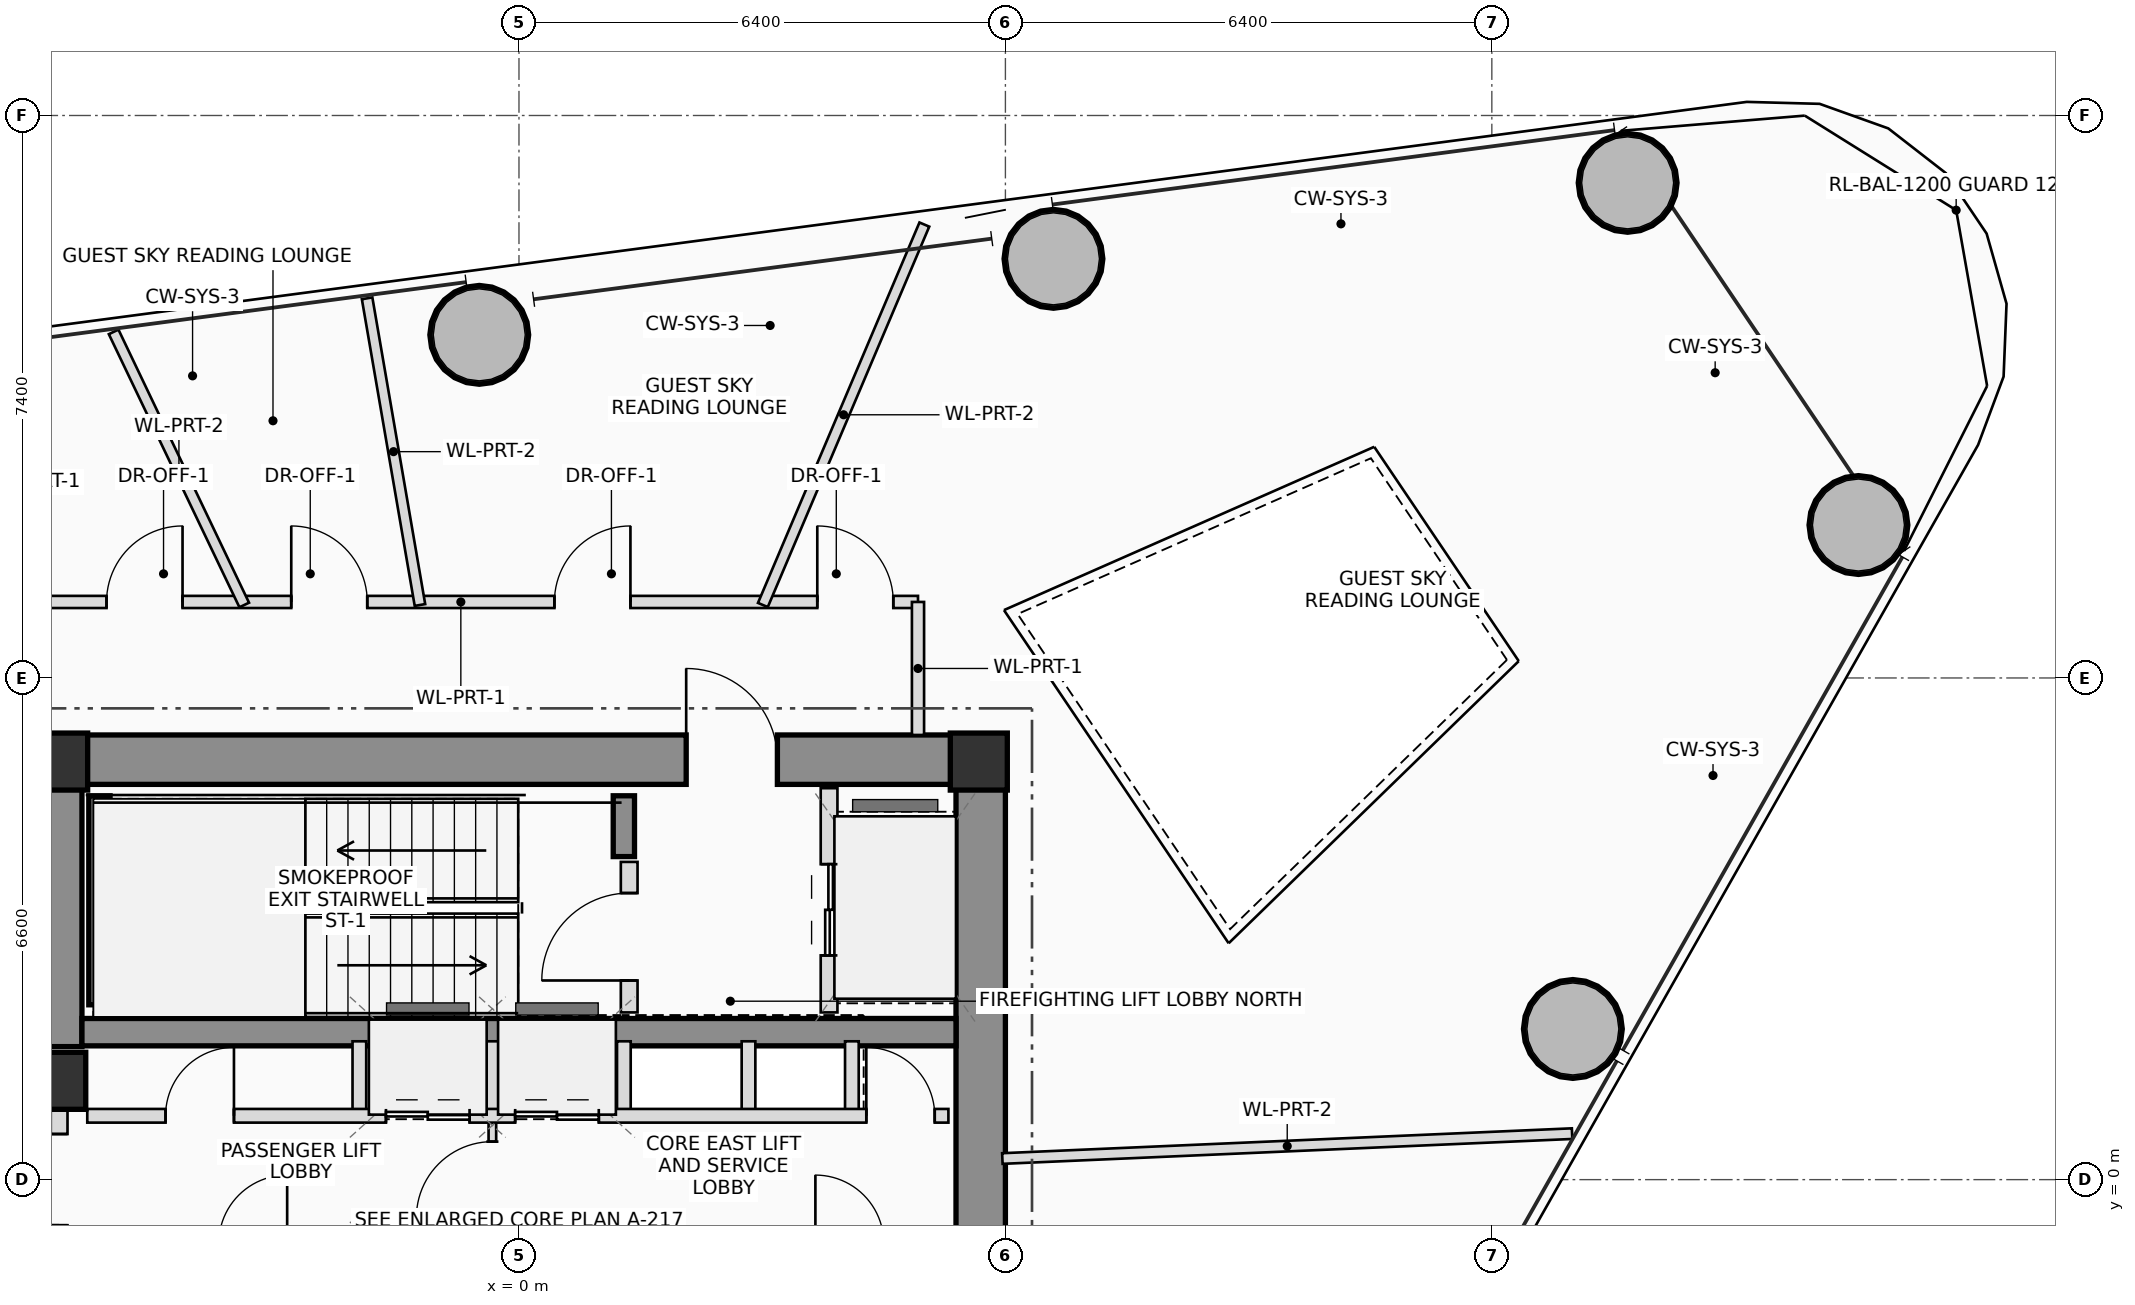
"""IFC4 building model, lengths in metres.
Left out: names, types, materials, properties, quantities, classifications, styles, units other than length and angle.
Written with IfcOpenShell. Run it as: python <this file> out.ifc"""

import sys

from ifc_helpers import new_model, si_unit, direction, frame, frame_2d, origin, origin_2d, place, context, subcontext, project, spatial, rectangle, hollow_circle, extrude, source, transform, mapped, element, fill, save


model = new_model("IFC4")
c1 = context("Model", 3, precision=1e-05, world=origin(), true_north=direction((0.0, 1.0)))
c2 = subcontext(c1, "Body", "Model", "MODEL_VIEW")
j1 = project(units=[si_unit("LENGTHUNIT", "METRE"), si_unit("PLANEANGLEUNIT", "RADIAN")], contexts=[c1])
p1 = place(None, origin())
s1 = spatial("IfcSite", under=j1, at=p1, CompositionType="ELEMENT")
p2 = place(p1, origin())
s2 = spatial("IfcBuilding", under=s1, at=p2, CompositionType="ELEMENT")
p3 = place(p2, frame((0.0, 0.0, 182.9)))
s3 = spatial("IfcBuildingStorey", under=s2, at=p3, CompositionType="ELEMENT", Elevation=182.9)
m1 = source(origin(), c2, "Body", "SweptSolid", [
    extrude(rectangle(XDim=0.75, YDim=0.75, at=origin_2d()), origin(), (0.0, 0.0, 1.0), 3.45),
])
for number, where, z_axis, x_axis in (
    (1, (6.05, 5.5, 0.0), (0.0, 0.0, 1.0), (1.0, 0.0, 0.0)),
    (2, (-6.05, 5.5, 0.0), (0.0, 0.0, 1.0), (1.0, 0.0, 0.0)),
):
    element("IfcColumn", number, at=place(p3, frame(where, z_axis=z_axis, x_axis=x_axis)), inside=s3, PredefinedType="COLUMN", context=c2, shape_type="MappedRepresentation", body=[
        mapped(m1, transform((0.0, 0.0, 0.0), scale=1.0)),
    ])
p4 = place(p3, frame((-6.4, 5.525, 0.0), z_axis=(0.0, 0.0, 1.0), x_axis=(1.0, 0.0, 0.0)))
e3 = element("IfcWall", 3, at=p4, inside=s3, PredefinedType="SHEAR", context=c2, shape_type="SweptSolid", body=[
    extrude(rectangle(XDim=12.8, YDim=0.65, at=frame_2d((6.4, 0.0))), origin(), (0.0, 0.0, 1.0), 3.45),
])
p5 = place(p4, frame((8.6, 0.0, 0.0)))
e4 = element("IfcOpeningElement", 4, at=p5, cuts=e3, PredefinedType="OPENING", context=c2, shape_type="SweptSolid", body=[
    extrude(rectangle(XDim=1.2, YDim=2.2, at=frame_2d((0.6, 1.1))), frame((0.0, 0.335, 0.0), z_axis=(0.0, -1.0, 0.0), x_axis=(1.0, 0.0, 0.0)), (0.0, 0.0, 1.0), 0.67),
])
p6 = place(p3, frame((6.075, -5.2, 0.0), z_axis=(0.0, 0.0, 1.0), x_axis=(0.0, 1.0, 0.0)))
e5 = element("IfcWall", 5, at=p6, inside=s3, PredefinedType="SHEAR", context=c2, shape_type="SweptSolid", body=[
    extrude(rectangle(XDim=10.4, YDim=0.65, at=frame_2d((5.2, 0.0))), origin(), (0.0, 0.0, 1.0), 3.45),
])
p7 = place(p3, frame((-6.075, 1.75, 0.0), z_axis=(0.0, 0.0, 1.0), x_axis=(0.0, 1.0, 0.0)))
e6 = element("IfcWall", 6, at=p7, inside=s3, PredefinedType="SHEAR", context=c2, shape_type="SweptSolid", body=[
    extrude(rectangle(XDim=3.45, YDim=0.65, at=frame_2d((1.725, 0.0))), origin(), (0.0, 0.0, 1.0), 3.45),
])
p8 = place(p3, frame((-5.75, 1.94, 0.0), z_axis=(0.0, 0.0, 1.0), x_axis=(1.0, 0.0, 0.0)))
e7 = element("IfcWall", 7, at=p8, inside=s3, PredefinedType="SHEAR", context=c2, shape_type="SweptSolid", body=[
    extrude(rectangle(XDim=11.5, YDim=0.36, at=frame_2d((5.75, 0.0))), origin(), (0.0, 0.0, 1.0), 3.45),
])
p9 = place(p3, frame((-5.52, 2.3, 0.0), z_axis=(0.0, 0.0, 1.0), x_axis=(0.0, 1.0, 0.0)))
e8 = element("IfcWall", 8, at=p9, inside=s3, PredefinedType="SHEAR", context=c2, shape_type="SweptSolid", body=[
    extrude(rectangle(XDim=2.75, YDim=0.28, at=frame_2d((1.375, 0.0))), origin(), (0.0, 0.0, 1.0), 3.45),
])
p10 = place(p3, frame((1.38, 4.25, 0.0), z_axis=(0.0, 0.0, 1.0), x_axis=(0.0, 1.0, 0.0)))
e9 = element("IfcWall", 9, at=p10, inside=s3, PredefinedType="SHEAR", context=c2, shape_type="SweptSolid", body=[
    extrude(rectangle(XDim=0.8, YDim=0.28, at=frame_2d((0.4, 0.0))), origin(), (0.0, 0.0, 1.0), 3.45),
])
p11 = place(p3, frame((-6.075, 1.3, 0.0), z_axis=(0.0, 0.0, 1.0), x_axis=(1.0, 0.0, 0.0)))
e10 = element("IfcColumn", 10, at=p11, inside=s3, PredefinedType="COLUMN", context=c2, shape_type="MappedRepresentation", body=[
    mapped(m1, transform((0.0, 0.0, 0.0), scale=1.0)),
])
m2 = source(origin(), c2, "Body", "SweptSolid", [
    extrude(hollow_circle(Radius=0.65, WallThickness=0.045, at=origin_2d()), origin(), (0.0, 0.0, 1.0), 3.45),
])
for number, where, z_axis, x_axis in (
    (11, (13.866, 1.982, 0.0), (0.0, 0.0, 1.0), (1.0, 0.0, 0.0)),
    (12, (17.624, 8.612, 0.0), (0.0, 0.0, 1.0), (1.0, 0.0, 0.0)),
    (13, (14.587, 13.114, 0.0), (0.0, 0.0, 1.0), (1.0, 0.0, 0.0)),
    (14, (7.032, 12.114, 0.0), (0.0, 0.0, 1.0), (1.0, 0.0, 0.0)),
    (15, (-0.522, 11.114, 0.0), (0.0, 0.0, 1.0), (1.0, 0.0, 0.0)),
):
    element("IfcColumn", number, at=place(p3, frame(where, z_axis=z_axis, x_axis=x_axis)), inside=s3, PredefinedType="COLUMN", context=c2, shape_type="MappedRepresentation", body=[
        mapped(m2, transform((0.0, 0.0, 0.0), scale=1.0)),
    ])
p12 = place(p3, frame((-6.05, -0.95, 0.0), z_axis=(0.0, 0.0, 1.0), x_axis=(0.0, 1.0, 0.0)))
e16 = element("IfcWall", 16, at=p12, inside=s3, PredefinedType="PLUMBINGWALL", context=c2, shape_type="SweptSolid", body=[
    extrude(rectangle(XDim=1.9, YDim=0.22, at=frame_2d((0.95, 0.0))), origin(), (0.0, 0.0, 1.0), 2.19),
])
p13 = place(p12, frame((0.35, 0.0, 0.0)))
e17 = element("IfcOpeningElement", 17, at=p13, cuts=e16, PredefinedType="OPENING", context=c2, shape_type="SweptSolid", body=[
    extrude(rectangle(XDim=1.2, YDim=2.2, at=frame_2d((0.6, 1.1))), frame((0.0, 0.12, 0.0), z_axis=(0.0, -1.0, 0.0), x_axis=(1.0, 0.0, 0.0)), (0.0, 0.0, 1.0), 0.24),
])
p14 = place(p3, frame((1.45, 2.2, 0.0), z_axis=(0.0, 0.0, 1.0), x_axis=(0.0, 1.0, 0.0)))
e18 = element("IfcWall", 18, at=p14, inside=s3, PredefinedType="PLUMBINGWALL", context=c2, shape_type="SweptSolid", body=[
    extrude(rectangle(XDim=1.98, YDim=0.22, at=frame_2d((0.99, 0.0))), origin(), (0.0, 0.0, 1.0), 3.21),
])
p15 = place(p14, frame((0.42, 0.0, 0.0)))
e19 = element("IfcOpeningElement", 19, at=p15, cuts=e18, PredefinedType="OPENING", context=c2, shape_type="SweptSolid", body=[
    extrude(rectangle(XDim=1.15, YDim=2.15, at=frame_2d((0.575, 1.075))), frame((0.0, 0.12, 0.0), z_axis=(0.0, -1.0, 0.0), x_axis=(1.0, 0.0, 0.0)), (0.0, 0.0, 1.0), 0.24),
])
p16 = place(p3, frame((4.08, 2.2, 0.0), z_axis=(0.0, 0.0, 1.0), x_axis=(0.0, 1.0, 0.0)))
e20 = element("IfcWall", 20, at=p16, inside=s3, PredefinedType="PLUMBINGWALL", context=c2, shape_type="SweptSolid", body=[
    extrude(rectangle(XDim=2.95, YDim=0.22, at=frame_2d((1.475, 0.0))), origin(), (0.0, 0.0, 1.0), 3.21),
])
p17 = place(p16, frame((0.75, 0.0, 0.0)))
e21 = element("IfcOpeningElement", 21, at=p17, cuts=e20, PredefinedType="OPENING", context=c2, shape_type="SweptSolid", body=[
    extrude(rectangle(XDim=1.2, YDim=2.25, at=frame_2d((0.6, 1.125))), frame((0.0, 0.12, 0.0), z_axis=(0.0, -1.0, 0.0), x_axis=(1.0, 0.0, 0.0)), (0.0, 0.0, 1.0), 0.24),
])
p18 = place(p3, frame((-0.35, -0.84, 0.0), z_axis=(0.0, 0.0, 1.0), x_axis=(0.0, 1.0, 0.0)))
e22 = element("IfcWall", 22, at=p18, inside=s3, PredefinedType="PARTITIONING", context=c2, shape_type="SweptSolid", body=[
    extrude(rectangle(XDim=1.68, YDim=0.1, at=frame_2d((0.84, 0.0))), origin(), (0.0, 0.0, 1.0), 3.21),
])
p19 = place(p18, frame((0.34, 0.0, 0.0)))
e23 = element("IfcOpeningElement", 23, at=p19, cuts=e22, PredefinedType="OPENING", context=c2, shape_type="SweptSolid", body=[
    extrude(rectangle(XDim=1.0, YDim=2.25, at=frame_2d((0.5, 1.125))), frame((0.0, 0.06, 0.0), z_axis=(0.0, -1.0, 0.0), x_axis=(1.0, 0.0, 0.0)), (0.0, 0.0, 1.0), 0.12),
])
for number, where, z_axis, x_axis in (
    (24, (-2.1, 0.84, 0.0), (0.0, 0.0, 1.0), (0.0, 1.0, 0.0)),
    (25, (-0.35, 0.84, 0.0), (0.0, 0.0, 1.0), (0.0, 1.0, 0.0)),
    (26, (1.38, 0.84, 0.0), (0.0, 0.0, 1.0), (0.0, 1.0, 0.0)),
    (27, (3.02, 0.84, 0.0), (0.0, 0.0, 1.0), (0.0, 1.0, 0.0)),
    (28, (4.38, 0.84, 0.0), (0.0, 0.0, 1.0), (0.0, 1.0, 0.0)),
):
    element("IfcWall", number, at=place(p3, frame(where, z_axis=z_axis, x_axis=x_axis)), inside=s3, PredefinedType="PLUMBINGWALL", context=c2, shape_type="SweptSolid", body=[
        extrude(rectangle(XDim=0.98, YDim=0.18, at=frame_2d((0.49, 0.0))), origin(), (0.0, 0.0, 1.0), 3.21),
    ])
p20 = place(p3, frame((-5.68, 0.84, 0.0), z_axis=(0.0, 0.0, 1.0), x_axis=(1.0, 0.0, 0.0)))
e29 = element("IfcWall", 29, at=p20, inside=s3, PredefinedType="PLUMBINGWALL", context=c2, shape_type="SweptSolid", body=[
    extrude(rectangle(XDim=11.33, YDim=0.18, at=frame_2d((5.665, 0.0))), origin(), (0.0, 0.0, 1.0), 3.21),
])
p21 = place(p20, frame((1.03, 0.0, 0.0)))
e30 = element("IfcOpeningElement", 30, at=p21, cuts=e29, PredefinedType="OPENING", context=c2, shape_type="SweptSolid", body=[
    extrude(rectangle(XDim=0.9, YDim=2.05, at=frame_2d((0.45, 1.025))), frame((0.0, 0.1, 0.0), z_axis=(0.0, -1.0, 0.0), x_axis=(1.0, 0.0, 0.0)), (0.0, 0.0, 1.0), 0.2),
])
p22 = place(p20, frame((3.93, 0.0, 0.0)))
e31 = element("IfcOpeningElement", 31, at=p22, cuts=e29, PredefinedType="OPENING", context=c2, shape_type="SweptSolid", body=[
    extrude(rectangle(XDim=1.1, YDim=2.2, at=frame_2d((0.55, 1.1))), frame((0.0, 0.1, 0.0), z_axis=(0.0, -1.0, 0.0), x_axis=(1.0, 0.0, 0.0)), (0.0, 0.0, 1.0), 0.2),
])
p23 = place(p20, frame((5.63, 0.0, 0.0)))
e32 = element("IfcOpeningElement", 32, at=p23, cuts=e29, PredefinedType="OPENING", context=c2, shape_type="SweptSolid", body=[
    extrude(rectangle(XDim=1.1, YDim=2.2, at=frame_2d((0.55, 1.1))), frame((0.0, 0.1, 0.0), z_axis=(0.0, -1.0, 0.0), x_axis=(1.0, 0.0, 0.0)), (0.0, 0.0, 1.0), 0.2),
])
p24 = place(p20, frame((10.25, 0.0, 0.0)))
e33 = element("IfcOpeningElement", 33, at=p24, cuts=e29, PredefinedType="OPENING", context=c2, shape_type="SweptSolid", body=[
    extrude(rectangle(XDim=0.9, YDim=2.05, at=frame_2d((0.45, 1.025))), frame((0.0, 0.1, 0.0), z_axis=(0.0, -1.0, 0.0), x_axis=(1.0, 0.0, 0.0)), (0.0, 0.0, 1.0), 0.2),
])
p25 = place(p3, frame((-6.36, 7.6, 0.0), z_axis=(0.0, 0.0, 1.0), x_axis=(1.0, 0.0, 0.0)))
e34 = element("IfcWall", 34, at=p25, inside=s3, PredefinedType="PARTITIONING", context=c2, shape_type="SweptSolid", body=[
    extrude(rectangle(XDim=11.61, YDim=0.16, at=frame_2d((5.805, 0.0))), origin(), (0.0, 0.0, 1.0), 2.565),
])
p26 = place(p25, frame((0.934, 0.0, 0.0)))
e35 = element("IfcOpeningElement", 35, at=p26, cuts=e34, PredefinedType="OPENING", context=c2, shape_type="SweptSolid", body=[
    extrude(rectangle(XDim=1.0, YDim=2.25, at=frame_2d((0.5, 1.125))), frame((0.0, 0.09, 0.0), z_axis=(0.0, -1.0, 0.0), x_axis=(1.0, 0.0, 0.0)), (0.0, 0.0, 1.0), 0.18),
])
p27 = place(p25, frame((3.364, 0.0, 0.0)))
e36 = element("IfcOpeningElement", 36, at=p27, cuts=e34, PredefinedType="OPENING", context=c2, shape_type="SweptSolid", body=[
    extrude(rectangle(XDim=1.0, YDim=2.25, at=frame_2d((0.5, 1.125))), frame((0.0, 0.09, 0.0), z_axis=(0.0, -1.0, 0.0), x_axis=(1.0, 0.0, 0.0)), (0.0, 0.0, 1.0), 0.18),
])
p28 = place(p25, frame((6.826, 0.0, 0.0)))
e37 = element("IfcOpeningElement", 37, at=p28, cuts=e34, PredefinedType="OPENING", context=c2, shape_type="SweptSolid", body=[
    extrude(rectangle(XDim=1.0, YDim=2.25, at=frame_2d((0.5, 1.125))), frame((0.0, 0.09, 0.0), z_axis=(0.0, -1.0, 0.0), x_axis=(1.0, 0.0, 0.0)), (0.0, 0.0, 1.0), 0.18),
])
p29 = place(p25, frame((10.285, 0.0, 0.0)))
e38 = element("IfcOpeningElement", 38, at=p29, cuts=e34, PredefinedType="OPENING", context=c2, shape_type="SweptSolid", body=[
    extrude(rectangle(XDim=1.0, YDim=2.25, at=frame_2d((0.5, 1.125))), frame((0.0, 0.09, 0.0), z_axis=(0.0, -1.0, 0.0), x_axis=(1.0, 0.0, 0.0)), (0.0, 0.0, 1.0), 0.18),
])
p30 = place(p3, frame((5.25, 7.6, 0.0), z_axis=(0.0, 0.0, 1.0), x_axis=(0.0, -1.0, 0.0)))
e39 = element("IfcWall", 39, at=p30, inside=s3, PredefinedType="PARTITIONING", context=c2, shape_type="SweptSolid", body=[
    extrude(rectangle(XDim=1.75, YDim=0.16, at=frame_2d((0.875, 0.0))), origin(), (0.0, 0.0, 1.0), 3.21),
])
p31 = place(p3, frame((6.36, 0.278, 0.0), z_axis=(0.0, 0.0, 1.0), x_axis=(0.999047543566, 0.043634913719, 0.0)))
e40 = element("IfcWall", 40, at=p31, inside=s3, PredefinedType="PARTITIONING", context=c2, shape_type="SweptSolid", body=[
    extrude(rectangle(XDim=7.503, YDim=0.14, at=frame_2d((3.751, 0.0))), origin(), (0.0, 0.0, 1.0), 2.725),
])
p32 = place(p3, frame((3.209, 7.56, 0.0), z_axis=(0.0, 0.0, 1.0), x_axis=(0.390725109397, 0.920507408382, 0.0)))
e41 = element("IfcWall", 41, at=p32, inside=s3, PredefinedType="PARTITIONING", context=c2, shape_type="SweptSolid", body=[
    extrude(rectangle(XDim=5.437, YDim=0.14, at=frame_2d((2.719, 0.0))), origin(), (0.0, 0.0, 1.0), 2.725),
])
p33 = place(p3, frame((-1.303, 7.56, 0.0), z_axis=(0.0, 0.0, 1.0), x_axis=(-0.169831033654, 0.985473195987, 0.0)))
e42 = element("IfcWall", 42, at=p33, inside=s3, PredefinedType="PARTITIONING", context=c2, shape_type="SweptSolid", body=[
    extrude(rectangle(XDim=4.094, YDim=0.14, at=frame_2d((2.047, 0.0))), origin(), (0.0, 0.0, 1.0), 2.565),
])
p34 = place(p3, frame((-3.615, 7.56, 0.0), z_axis=(0.0, 0.0, 1.0), x_axis=(-0.431353551372, 0.902182971308, 0.0)))
e43 = element("IfcWall", 43, at=p34, inside=s3, PredefinedType="PARTITIONING", context=c2, shape_type="SweptSolid", body=[
    extrude(rectangle(XDim=3.983, YDim=0.14, at=frame_2d((1.991, 0.0))), origin(), (0.0, 0.0, 1.0), 2.565),
])
p35 = place(p5, origin())
e44 = element("IfcDoor", 44, at=p35, inside=s3, OperationType="SINGLE_SWING_LEFT", PredefinedType="DOOR", context=c2, shape_type="SweptSolid", body=[
    extrude(rectangle(XDim=1.2, YDim=2.2, at=frame_2d((0.6, 1.1))), frame((0.0, 0.025, 0.0), z_axis=(0.0, -1.0, 0.0), x_axis=(1.0, 0.0, 0.0)), (0.0, 0.0, 1.0), 0.05),
])
fill(e4, e44)
p36 = place(p13, origin())
e45 = element("IfcDoor", 45, at=p36, inside=s3, OperationType="SINGLE_SWING_LEFT", PredefinedType="DOOR", context=c2, shape_type="SweptSolid", body=[
    extrude(rectangle(XDim=1.2, YDim=2.2, at=frame_2d((0.6, 1.1))), frame((0.0, 0.025, 0.0), z_axis=(0.0, -1.0, 0.0), x_axis=(1.0, 0.0, 0.0)), (0.0, 0.0, 1.0), 0.05),
])
fill(e17, e45)
p37 = place(p15, origin())
e46 = element("IfcDoor", 46, at=p37, inside=s3, OperationType="SINGLE_SWING_LEFT", PredefinedType="DOOR", context=c2, shape_type="SweptSolid", body=[
    extrude(rectangle(XDim=1.15, YDim=2.15, at=frame_2d((0.575, 1.075))), frame((0.0, 0.025, 0.0), z_axis=(0.0, -1.0, 0.0), x_axis=(1.0, 0.0, 0.0)), (0.0, 0.0, 1.0), 0.05),
])
fill(e19, e46)
p38 = place(p17, origin())
e47 = element("IfcDoor", 47, at=p38, inside=s3, OperationType="DOUBLE_DOOR_SLIDING", PredefinedType="DOOR", context=c2, shape_type="SweptSolid", body=[
    extrude(rectangle(XDim=1.2, YDim=2.25, at=frame_2d((0.6, 1.125))), frame((0.0, 0.025, 0.0), z_axis=(0.0, -1.0, 0.0), x_axis=(1.0, 0.0, 0.0)), (0.0, 0.0, 1.0), 0.05),
])
fill(e21, e47)
p39 = place(p19, origin())
e48 = element("IfcDoor", 48, at=p39, inside=s3, OperationType="SINGLE_SWING_LEFT", PredefinedType="DOOR", context=c2, shape_type="SweptSolid", body=[
    extrude(rectangle(XDim=1.0, YDim=2.25, at=frame_2d((0.5, 1.125))), frame((0.0, 0.025, 0.0), z_axis=(0.0, -1.0, 0.0), x_axis=(1.0, 0.0, 0.0)), (0.0, 0.0, 1.0), 0.05),
])
fill(e23, e48)
p40 = place(p21, origin())
e49 = element("IfcDoor", 49, at=p40, inside=s3, OperationType="SINGLE_SWING_RIGHT", PredefinedType="DOOR", context=c2, shape_type="SweptSolid", body=[
    extrude(rectangle(XDim=0.9, YDim=2.05, at=frame_2d((0.45, 1.025))), frame((0.0, 0.025, 0.0), z_axis=(0.0, -1.0, 0.0), x_axis=(1.0, 0.0, 0.0)), (0.0, 0.0, 1.0), 0.05),
])
fill(e30, e49)
p41 = place(p22, origin())
e50 = element("IfcDoor", 50, at=p41, inside=s3, OperationType="DOUBLE_DOOR_SLIDING", PredefinedType="DOOR", context=c2, shape_type="SweptSolid", body=[
    extrude(rectangle(XDim=1.1, YDim=2.2, at=frame_2d((0.55, 1.1))), frame((0.0, 0.025, 0.0), z_axis=(0.0, -1.0, 0.0), x_axis=(1.0, 0.0, 0.0)), (0.0, 0.0, 1.0), 0.05),
])
fill(e31, e50)
p42 = place(p23, origin())
e51 = element("IfcDoor", 51, at=p42, inside=s3, OperationType="DOUBLE_DOOR_SLIDING", PredefinedType="DOOR", context=c2, shape_type="SweptSolid", body=[
    extrude(rectangle(XDim=1.1, YDim=2.2, at=frame_2d((0.55, 1.1))), frame((0.0, 0.025, 0.0), z_axis=(0.0, -1.0, 0.0), x_axis=(1.0, 0.0, 0.0)), (0.0, 0.0, 1.0), 0.05),
])
fill(e32, e51)
p43 = place(p24, origin())
e52 = element("IfcDoor", 52, at=p43, inside=s3, OperationType="SINGLE_SWING_LEFT", PredefinedType="DOOR", context=c2, shape_type="SweptSolid", body=[
    extrude(rectangle(XDim=0.9, YDim=2.05, at=frame_2d((0.45, 1.025))), frame((0.0, 0.025, 0.0), z_axis=(0.0, -1.0, 0.0), x_axis=(1.0, 0.0, 0.0)), (0.0, 0.0, 1.0), 0.05),
])
fill(e33, e52)
p44 = place(p26, origin())
e53 = element("IfcDoor", 53, at=p44, inside=s3, OperationType="SINGLE_SWING_RIGHT", PredefinedType="DOOR", context=c2, shape_type="SweptSolid", body=[
    extrude(rectangle(XDim=1.0, YDim=2.25, at=frame_2d((0.5, 1.125))), frame((0.0, 0.025, 0.0), z_axis=(0.0, -1.0, 0.0), x_axis=(1.0, 0.0, 0.0)), (0.0, 0.0, 1.0), 0.05),
])
fill(e35, e53)
p45 = place(p27, origin())
e54 = element("IfcDoor", 54, at=p45, inside=s3, OperationType="SINGLE_SWING_LEFT", PredefinedType="DOOR", context=c2, shape_type="SweptSolid", body=[
    extrude(rectangle(XDim=1.0, YDim=2.25, at=frame_2d((0.5, 1.125))), frame((0.0, 0.025, 0.0), z_axis=(0.0, -1.0, 0.0), x_axis=(1.0, 0.0, 0.0)), (0.0, 0.0, 1.0), 0.05),
])
fill(e36, e54)
p46 = place(p28, origin())
e55 = element("IfcDoor", 55, at=p46, inside=s3, OperationType="SINGLE_SWING_RIGHT", PredefinedType="DOOR", context=c2, shape_type="SweptSolid", body=[
    extrude(rectangle(XDim=1.0, YDim=2.25, at=frame_2d((0.5, 1.125))), frame((0.0, 0.025, 0.0), z_axis=(0.0, -1.0, 0.0), x_axis=(1.0, 0.0, 0.0)), (0.0, 0.0, 1.0), 0.05),
])
fill(e37, e55)
p47 = place(p29, origin())
e56 = element("IfcDoor", 56, at=p47, inside=s3, OperationType="SINGLE_SWING_LEFT", PredefinedType="DOOR", context=c2, shape_type="SweptSolid", body=[
    extrude(rectangle(XDim=1.0, YDim=2.25, at=frame_2d((0.5, 1.125))), frame((0.0, 0.025, 0.0), z_axis=(0.0, -1.0, 0.0), x_axis=(1.0, 0.0, 0.0)), (0.0, 0.0, 1.0), 0.05),
])
fill(e38, e56)
save(model, sys.argv[1])
